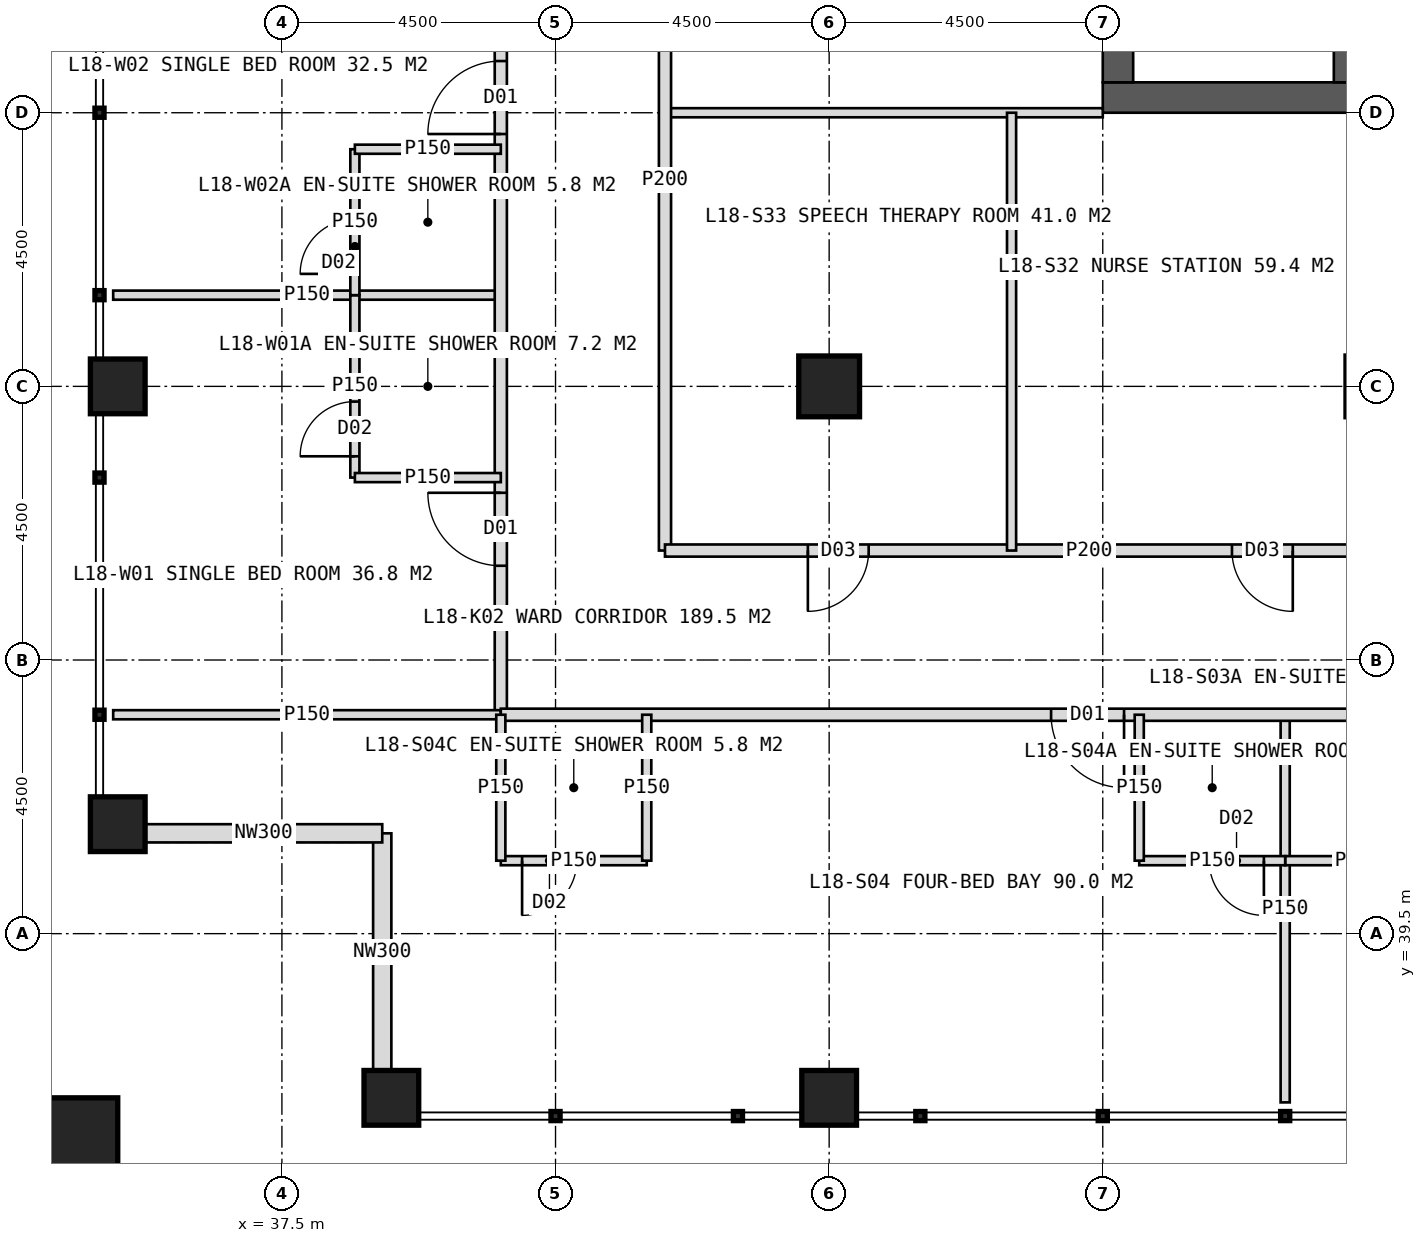
"""IFC4 building model, lengths in metres.
Left out: names, types, materials, properties, quantities, classifications, styles, units other than length and angle.
Written with IfcOpenShell. Run it as: python <this file> out.ifc"""

import sys

from ifc_helpers import new_model, si_unit, direction, frame, frame_2d, origin, origin_2d, place, context, subcontext, project, spatial, rectangle, hollow_rectangle, extrude, element, fill, save


model = new_model("IFC4")
c1 = context("Model", 3, precision=1e-05, world=origin(), true_north=direction((0.0, 1.0)))
c2 = subcontext(c1, "Body", "Model", "MODEL_VIEW")
j1 = project(units=[si_unit("LENGTHUNIT", "METRE"), si_unit("PLANEANGLEUNIT", "RADIAN")], contexts=[c1])
p1 = place(None, origin())
s1 = spatial("IfcSite", under=j1, at=p1, CompositionType="ELEMENT")
p2 = place(p1, origin())
s2 = spatial("IfcBuilding", under=s1, at=p2, CompositionType="ELEMENT")
p3 = place(p2, frame((0.0, 0.0, 79.0)))
s3 = spatial("IfcBuildingStorey", under=s2, at=p3, CompositionType="ELEMENT", Elevation=79.0)
p4 = place(p3, frame((51.0, 53.25, 0.0), z_axis=(0.0, 0.0, 1.0), x_axis=(1.0, 0.0, 0.0)))
e1 = element("IfcWall", 1, at=p4, inside=s3, PredefinedType="SHEAR", context=c2, shape_type="SweptSolid", body=[
    extrude(rectangle(XDim=18.0, YDim=0.5, at=frame_2d((9.0, 0.0))), origin(), (0.0, 0.0, 1.0), 4.0),
])
p5 = place(p4, frame((8.1, 0.0, 0.0)))
e2 = element("IfcOpeningElement", 2, at=p5, cuts=e1, PredefinedType="OPENING", context=c2, shape_type="SweptSolid", body=[
    extrude(rectangle(XDim=1.8, YDim=2.2, at=frame_2d((0.9, 1.1))), frame((0.0, 0.26, 0.0), z_axis=(0.0, -1.0, 0.0), x_axis=(1.0, 0.0, 0.0)), (0.0, 0.0, 1.0), 0.52),
])
p6 = place(p3, frame((51.25, 53.5, 0.0), z_axis=(0.0, 0.0, 1.0), x_axis=(0.0, 1.0, 0.0)))
e3 = element("IfcWall", 3, at=p6, inside=s3, PredefinedType="SHEAR", context=c2, shape_type="SweptSolid", body=[
    extrude(rectangle(XDim=17.0, YDim=0.5, at=frame_2d((8.5, 0.0))), origin(), (0.0, 0.0, 1.0), 4.0),
])
p7 = place(p6, frame((6.0, 0.0, 0.0)))
e4 = element("IfcOpeningElement", 4, at=p7, cuts=e3, PredefinedType="OPENING", context=c2, shape_type="SweptSolid", body=[
    extrude(rectangle(XDim=1.5, YDim=2.2, at=frame_2d((0.75, 1.1))), frame((0.0, 0.26, 0.0), z_axis=(0.0, -1.0, 0.0), x_axis=(1.0, 0.0, 0.0)), (0.0, 0.0, 1.0), 0.52),
])
p8 = place(p3, frame((54.95, 53.5, 0.0), z_axis=(0.0, 0.0, 1.0), x_axis=(0.0, 1.0, 0.0)))
e5 = element("IfcWall", 5, at=p8, inside=s3, PredefinedType="SHEAR", context=c2, shape_type="SweptSolid", body=[
    extrude(rectangle(XDim=17.0, YDim=0.3, at=frame_2d((8.5, 0.0))), origin(), (0.0, 0.0, 1.0), 4.0),
])
p9 = place(p3, frame((46.5, 48.5, 0.0), z_axis=(0.0, 0.0, 1.0), x_axis=(1.0, 0.0, 0.0)))
e6 = element("IfcColumn", 6, at=p9, inside=s3, PredefinedType="COLUMN", context=c2, shape_type="SweptSolid", body=[
    extrude(hollow_rectangle(XDim=1.0, YDim=1.0, WallThickness=0.1, at=origin_2d()), origin(), (0.0, 0.0, 1.0), 4.0),
])
for number, where, z_axis, x_axis in (
    (7, (39.3, 36.8, 0.0), (0.0, 0.0, 1.0), (1.0, 0.0, 0.0)),
    (8, (34.8, 41.3, 0.0), (0.0, 0.0, 1.0), (1.0, 0.0, 0.0)),
    (9, (46.5, 36.8, 0.0), (0.0, 0.0, 1.0), (1.0, 0.0, 0.0)),
    (10, (34.8, 48.5, 0.0), (0.0, 0.0, 1.0), (1.0, 0.0, 0.0)),
):
    element("IfcColumn", number, at=place(p3, frame(where, z_axis=z_axis, x_axis=x_axis)), inside=s3, PredefinedType="COLUMN", context=c2, shape_type="SweptSolid", body=[
        extrude(hollow_rectangle(XDim=0.9, YDim=0.9, WallThickness=0.08, at=origin_2d()), origin(), (0.0, 0.0, 1.0), 4.0),
    ])
p10 = place(p3, frame((33.9, 35.9, 0.0), z_axis=(0.0, 0.0, 1.0), x_axis=(1.0, 0.0, 0.0)))
e11 = element("IfcColumn", 11, at=p10, inside=s3, PredefinedType="COLUMN", context=c2, shape_type="SweptSolid", body=[
    extrude(hollow_rectangle(XDim=1.8, YDim=1.8, WallThickness=0.1, at=origin_2d()), origin(), (0.0, 0.0, 1.0), 4.0),
])
for number, where, z_axis, x_axis in (
    (12, (39.15, 37.25, 0.0), (0.0, 0.0, 1.0), (0.0, 1.0, 0.0)),
    (13, (39.15, 41.15, 0.0), (0.0, 0.0, 1.0), (-1.0, 0.0, 0.0)),
):
    element("IfcWall", number, at=place(p3, frame(where, z_axis=z_axis, x_axis=x_axis)), inside=s3, PredefinedType="ELEMENTEDWALL", context=c2, shape_type="SweptSolid", body=[
        extrude(rectangle(XDim=3.9, YDim=0.3, at=frame_2d((1.95, 0.0))), origin(), (0.0, 0.0, 1.0), 2.95),
    ])
p11 = place(p3, frame((41.1, 50.0, 0.0), z_axis=(0.0, 0.0, 1.0), x_axis=(-1.0, 0.0, 0.0)))
e14 = element("IfcWall", 14, at=p11, inside=s3, PredefinedType="PARTITIONING", context=c2, shape_type="SweptSolid", body=[
    extrude(rectangle(XDim=6.375, YDim=0.15, at=frame_2d((3.188, 0.0))), origin(), (0.0, 0.0, 1.0), 3.75),
])
p12 = place(p3, frame((41.1, 43.1, 0.0), z_axis=(0.0, 0.0, 1.0), x_axis=(0.0, 1.0, 0.0)))
e15 = element("IfcWall", 15, at=p12, inside=s3, PredefinedType="PARTITIONING", context=c2, shape_type="SweptSolid", body=[
    extrude(rectangle(XDim=37.8, YDim=0.2, at=frame_2d((18.9, 0.0))), origin(), (0.0, 0.0, 1.0), 3.75),
])
p13 = place(p12, frame((2.45, 0.0, 0.0)))
e16 = element("IfcOpeningElement", 16, at=p13, cuts=e15, PredefinedType="OPENING", context=c2, shape_type="SweptSolid", body=[
    extrude(rectangle(XDim=1.2, YDim=2.2, at=frame_2d((0.6, 1.1))), frame((0.0, 0.11, 0.0), z_axis=(0.0, -1.0, 0.0), x_axis=(1.0, 0.0, 0.0)), (0.0, 0.0, 1.0), 0.22),
])
p14 = place(p12, frame((9.55, 0.0, 0.0)))
e17 = element("IfcOpeningElement", 17, at=p14, cuts=e15, PredefinedType="OPENING", context=c2, shape_type="SweptSolid", body=[
    extrude(rectangle(XDim=1.2, YDim=2.2, at=frame_2d((0.6, 1.1))), frame((0.0, 0.11, 0.0), z_axis=(0.0, -1.0, 0.0), x_axis=(1.0, 0.0, 0.0)), (0.0, 0.0, 1.0), 0.22),
])
p15 = place(p12, frame((15.05, 0.0, 0.0)))
e18 = element("IfcOpeningElement", 18, at=p15, cuts=e15, PredefinedType="OPENING", context=c2, shape_type="SweptSolid", body=[
    extrude(rectangle(XDim=1.2, YDim=2.2, at=frame_2d((0.6, 1.1))), frame((0.0, 0.11, 0.0), z_axis=(0.0, -1.0, 0.0), x_axis=(1.0, 0.0, 0.0)), (0.0, 0.0, 1.0), 0.22),
])
p16 = place(p12, frame((21.55, 0.0, 0.0)))
e19 = element("IfcOpeningElement", 19, at=p16, cuts=e15, PredefinedType="OPENING", context=c2, shape_type="SweptSolid", body=[
    extrude(rectangle(XDim=1.2, YDim=2.2, at=frame_2d((0.6, 1.1))), frame((0.0, 0.11, 0.0), z_axis=(0.0, -1.0, 0.0), x_axis=(1.0, 0.0, 0.0)), (0.0, 0.0, 1.0), 0.22),
])
p17 = place(p12, frame((33.95, 0.0, 0.0)))
e20 = element("IfcOpeningElement", 20, at=p17, cuts=e15, PredefinedType="OPENING", context=c2, shape_type="SweptSolid", body=[
    extrude(rectangle(XDim=1.2, YDim=2.2, at=frame_2d((0.6, 1.1))), frame((0.0, 0.11, 0.0), z_axis=(0.0, -1.0, 0.0), x_axis=(1.0, 0.0, 0.0)), (0.0, 0.0, 1.0), 0.22),
])
p18 = place(p3, frame((41.1, 43.1, 0.0), z_axis=(0.0, 0.0, 1.0), x_axis=(-1.0, 0.0, 0.0)))
e21 = element("IfcWall", 21, at=p18, inside=s3, PredefinedType="PARTITIONING", context=c2, shape_type="SweptSolid", body=[
    extrude(rectangle(XDim=6.375, YDim=0.15, at=frame_2d((3.188, 0.0))), origin(), (0.0, 0.0, 1.0), 3.75),
])
p19 = place(p3, frame((38.7, 47.0, 0.0), z_axis=(0.0, 0.0, 1.0), x_axis=(0.0, 1.0, 0.0)))
e22 = element("IfcWall", 22, at=p19, inside=s3, PredefinedType="PARTITIONING", context=c2, shape_type="SweptSolid", body=[
    extrude(rectangle(XDim=3.0, YDim=0.15, at=frame_2d((1.5, 0.0))), origin(), (0.0, 0.0, 1.0), 3.75),
])
p20 = place(p19, frame((0.35, 0.0, 0.0)))
e23 = element("IfcOpeningElement", 23, at=p20, cuts=e22, PredefinedType="OPENING", context=c2, shape_type="SweptSolid", body=[
    extrude(rectangle(XDim=0.9, YDim=2.1, at=frame_2d((0.45, 1.05))), frame((0.0, 0.085, 0.0), z_axis=(0.0, -1.0, 0.0), x_axis=(1.0, 0.0, 0.0)), (0.0, 0.0, 1.0), 0.17),
])
p21 = place(p3, frame((41.1, 47.0, 0.0), z_axis=(0.0, 0.0, 1.0), x_axis=(-1.0, 0.0, 0.0)))
e24 = element("IfcWall", 24, at=p21, inside=s3, PredefinedType="PARTITIONING", context=c2, shape_type="SweptSolid", body=[
    extrude(rectangle(XDim=2.4, YDim=0.15, at=frame_2d((1.2, 0.0))), origin(), (0.0, 0.0, 1.0), 3.75),
])
p22 = place(p3, frame((38.7, 50.0, 0.0), z_axis=(0.0, 0.0, 1.0), x_axis=(0.0, 1.0, 0.0)))
e25 = element("IfcWall", 25, at=p22, inside=s3, PredefinedType="PARTITIONING", context=c2, shape_type="SweptSolid", body=[
    extrude(rectangle(XDim=2.4, YDim=0.15, at=frame_2d((1.2, 0.0))), origin(), (0.0, 0.0, 1.0), 3.75),
])
p23 = place(p22, frame((0.35, 0.0, 0.0)))
e26 = element("IfcOpeningElement", 26, at=p23, cuts=e25, PredefinedType="OPENING", context=c2, shape_type="SweptSolid", body=[
    extrude(rectangle(XDim=0.9, YDim=2.1, at=frame_2d((0.45, 1.05))), frame((0.0, 0.085, 0.0), z_axis=(0.0, -1.0, 0.0), x_axis=(1.0, 0.0, 0.0)), (0.0, 0.0, 1.0), 0.17),
])
p24 = place(p3, frame((41.1, 52.4, 0.0), z_axis=(0.0, 0.0, 1.0), x_axis=(-1.0, 0.0, 0.0)))
e27 = element("IfcWall", 27, at=p24, inside=s3, PredefinedType="PARTITIONING", context=c2, shape_type="SweptSolid", body=[
    extrude(rectangle(XDim=2.4, YDim=0.15, at=frame_2d((1.2, 0.0))), origin(), (0.0, 0.0, 1.0), 3.75),
])
p25 = place(p3, frame((51.0, 53.0, 0.0), z_axis=(0.0, 0.0, 1.0), x_axis=(-1.0, 0.0, 0.0)))
e28 = element("IfcWall", 28, at=p25, inside=s3, PredefinedType="PARTITIONING", context=c2, shape_type="SweptSolid", body=[
    extrude(rectangle(XDim=7.2, YDim=0.15, at=frame_2d((3.6, 0.0))), origin(), (0.0, 0.0, 1.0), 3.75),
])
p26 = place(p3, frame((43.8, 45.8, 0.0), z_axis=(0.0, 0.0, 1.0), x_axis=(0.0, 1.0, 0.0)))
e29 = element("IfcWall", 29, at=p26, inside=s3, PredefinedType="PARTITIONING", context=c2, shape_type="SweptSolid", body=[
    extrude(rectangle(XDim=12.2, YDim=0.2, at=frame_2d((6.1, 0.0))), origin(), (0.0, 0.0, 1.0), 3.75),
])
p27 = place(p26, frame((9.2, 0.0, 0.0)))
e30 = element("IfcOpeningElement", 30, at=p27, cuts=e29, PredefinedType="OPENING", context=c2, shape_type="SweptSolid", body=[
    extrude(rectangle(XDim=1.0, YDim=2.1, at=frame_2d((0.5, 1.05))), frame((0.0, 0.11, 0.0), z_axis=(0.0, -1.0, 0.0), x_axis=(1.0, 0.0, 0.0)), (0.0, 0.0, 1.0), 0.22),
])
p28 = place(p3, frame((54.0, 43.1, 0.0), z_axis=(0.0, 0.0, 1.0), x_axis=(0.0, -1.0, 0.0)))
e31 = element("IfcWall", 31, at=p28, inside=s3, PredefinedType="PARTITIONING", context=c2, shape_type="SweptSolid", body=[
    extrude(rectangle(XDim=6.375, YDim=0.15, at=frame_2d((3.188, 0.0))), origin(), (0.0, 0.0, 1.0), 3.75),
])
p29 = place(p3, frame((78.9, 43.1, 0.0), z_axis=(0.0, 0.0, 1.0), x_axis=(-1.0, 0.0, 0.0)))
e32 = element("IfcWall", 32, at=p29, inside=s3, PredefinedType="PARTITIONING", context=c2, shape_type="SweptSolid", body=[
    extrude(rectangle(XDim=37.8, YDim=0.2, at=frame_2d((18.9, 0.0))), origin(), (0.0, 0.0, 1.0), 3.75),
])
p30 = place(p29, frame((6.05, 0.0, 0.0)))
e33 = element("IfcOpeningElement", 33, at=p30, cuts=e32, PredefinedType="OPENING", context=c2, shape_type="SweptSolid", body=[
    extrude(rectangle(XDim=1.2, YDim=2.2, at=frame_2d((0.6, 1.1))), frame((0.0, 0.11, 0.0), z_axis=(0.0, -1.0, 0.0), x_axis=(1.0, 0.0, 0.0)), (0.0, 0.0, 1.0), 0.22),
])
p31 = place(p29, frame((12.55, 0.0, 0.0)))
e34 = element("IfcOpeningElement", 34, at=p31, cuts=e32, PredefinedType="OPENING", context=c2, shape_type="SweptSolid", body=[
    extrude(rectangle(XDim=1.2, YDim=2.2, at=frame_2d((0.6, 1.1))), frame((0.0, 0.11, 0.0), z_axis=(0.0, -1.0, 0.0), x_axis=(1.0, 0.0, 0.0)), (0.0, 0.0, 1.0), 0.22),
])
p32 = place(p29, frame((21.05, 0.0, 0.0)))
e35 = element("IfcOpeningElement", 35, at=p32, cuts=e32, PredefinedType="OPENING", context=c2, shape_type="SweptSolid", body=[
    extrude(rectangle(XDim=1.2, YDim=2.2, at=frame_2d((0.6, 1.1))), frame((0.0, 0.11, 0.0), z_axis=(0.0, -1.0, 0.0), x_axis=(1.0, 0.0, 0.0)), (0.0, 0.0, 1.0), 0.22),
])
p33 = place(p29, frame((27.55, 0.0, 0.0)))
e36 = element("IfcOpeningElement", 36, at=p33, cuts=e32, PredefinedType="OPENING", context=c2, shape_type="SweptSolid", body=[
    extrude(rectangle(XDim=1.2, YDim=2.2, at=frame_2d((0.6, 1.1))), frame((0.0, 0.11, 0.0), z_axis=(0.0, -1.0, 0.0), x_axis=(1.0, 0.0, 0.0)), (0.0, 0.0, 1.0), 0.22),
])
p34 = place(p3, frame((56.4, 40.7, 0.0), z_axis=(0.0, 0.0, 1.0), x_axis=(-1.0, 0.0, 0.0)))
e37 = element("IfcWall", 37, at=p34, inside=s3, PredefinedType="PARTITIONING", context=c2, shape_type="SweptSolid", body=[
    extrude(rectangle(XDim=2.4, YDim=0.15, at=frame_2d((1.2, 0.0))), origin(), (0.0, 0.0, 1.0), 3.75),
])
p35 = place(p34, frame((0.35, 0.0, 0.0)))
e38 = element("IfcOpeningElement", 38, at=p35, cuts=e37, PredefinedType="OPENING", context=c2, shape_type="SweptSolid", body=[
    extrude(rectangle(XDim=0.9, YDim=2.1, at=frame_2d((0.45, 1.05))), frame((0.0, 0.085, 0.0), z_axis=(0.0, -1.0, 0.0), x_axis=(1.0, 0.0, 0.0)), (0.0, 0.0, 1.0), 0.17),
])
p36 = place(p3, frame((54.0, 40.7, 0.0), z_axis=(0.0, 0.0, 1.0), x_axis=(-1.0, 0.0, 0.0)))
e39 = element("IfcWall", 39, at=p36, inside=s3, PredefinedType="PARTITIONING", context=c2, shape_type="SweptSolid", body=[
    extrude(rectangle(XDim=2.4, YDim=0.15, at=frame_2d((1.2, 0.0))), origin(), (0.0, 0.0, 1.0), 3.75),
])
p37 = place(p36, frame((0.35, 0.0, 0.0)))
e40 = element("IfcOpeningElement", 40, at=p37, cuts=e39, PredefinedType="OPENING", context=c2, shape_type="SweptSolid", body=[
    extrude(rectangle(XDim=0.9, YDim=2.1, at=frame_2d((0.45, 1.05))), frame((0.0, 0.085, 0.0), z_axis=(0.0, -1.0, 0.0), x_axis=(1.0, 0.0, 0.0)), (0.0, 0.0, 1.0), 0.17),
])
p38 = place(p3, frame((51.6, 43.1, 0.0), z_axis=(0.0, 0.0, 1.0), x_axis=(0.0, -1.0, 0.0)))
e41 = element("IfcWall", 41, at=p38, inside=s3, PredefinedType="PARTITIONING", context=c2, shape_type="SweptSolid", body=[
    extrude(rectangle(XDim=2.4, YDim=0.15, at=frame_2d((1.2, 0.0))), origin(), (0.0, 0.0, 1.0), 3.75),
])
p39 = place(p3, frame((43.5, 40.7, 0.0), z_axis=(0.0, 0.0, 1.0), x_axis=(-1.0, 0.0, 0.0)))
e42 = element("IfcWall", 42, at=p39, inside=s3, PredefinedType="PARTITIONING", context=c2, shape_type="SweptSolid", body=[
    extrude(rectangle(XDim=2.4, YDim=0.15, at=frame_2d((1.2, 0.0))), origin(), (0.0, 0.0, 1.0), 3.75),
])
p40 = place(p39, frame((1.15, 0.0, 0.0)))
e43 = element("IfcOpeningElement", 43, at=p40, cuts=e42, PredefinedType="OPENING", context=c2, shape_type="SweptSolid", body=[
    extrude(rectangle(XDim=0.9, YDim=2.1, at=frame_2d((0.45, 1.05))), frame((0.0, 0.085, 0.0), z_axis=(0.0, -1.0, 0.0), x_axis=(1.0, 0.0, 0.0)), (0.0, 0.0, 1.0), 0.17),
])
for number, where, z_axis, x_axis in (
    (44, (43.5, 43.1, 0.0), (0.0, 0.0, 1.0), (0.0, -1.0, 0.0)),
    (45, (41.1, 43.1, 0.0), (0.0, 0.0, 1.0), (0.0, -1.0, 0.0)),
):
    element("IfcWall", number, at=place(p3, frame(where, z_axis=z_axis, x_axis=x_axis)), inside=s3, PredefinedType="PARTITIONING", context=c2, shape_type="SweptSolid", body=[
        extrude(rectangle(XDim=2.4, YDim=0.15, at=frame_2d((1.2, 0.0))), origin(), (0.0, 0.0, 1.0), 3.75),
    ])
p41 = place(p3, frame((57.75, 45.8, 0.0), z_axis=(0.0, 0.0, 1.0), x_axis=(-1.0, 0.0, 0.0)))
e46 = element("IfcWall", 46, at=p41, inside=s3, PredefinedType="PARTITIONING", context=c2, shape_type="SweptSolid", body=[
    extrude(rectangle(XDim=13.95, YDim=0.2, at=frame_2d((6.975, 0.0))), origin(), (0.0, 0.0, 1.0), 3.75),
])
p42 = place(p41, frame((3.625, 0.0, 0.0)))
e47 = element("IfcOpeningElement", 47, at=p42, cuts=e46, PredefinedType="OPENING", context=c2, shape_type="SweptSolid", body=[
    extrude(rectangle(XDim=1.0, YDim=2.1, at=frame_2d((0.5, 1.05))), frame((0.0, 0.11, 0.0), z_axis=(0.0, -1.0, 0.0), x_axis=(1.0, 0.0, 0.0)), (0.0, 0.0, 1.0), 0.22),
])
p43 = place(p41, frame((10.6, 0.0, 0.0)))
e48 = element("IfcOpeningElement", 48, at=p43, cuts=e46, PredefinedType="OPENING", context=c2, shape_type="SweptSolid", body=[
    extrude(rectangle(XDim=1.0, YDim=2.1, at=frame_2d((0.5, 1.05))), frame((0.0, 0.11, 0.0), z_axis=(0.0, -1.0, 0.0), x_axis=(1.0, 0.0, 0.0)), (0.0, 0.0, 1.0), 0.22),
])
p44 = place(p3, frame((49.5, 53.0, 0.0), z_axis=(0.0, 0.0, 1.0), x_axis=(0.0, -1.0, 0.0)))
e49 = element("IfcWall", 49, at=p44, inside=s3, PredefinedType="PARTITIONING", context=c2, shape_type="SweptSolid", body=[
    extrude(rectangle(XDim=7.2, YDim=0.15, at=frame_2d((3.6, 0.0))), origin(), (0.0, 0.0, 1.0), 3.75),
])
p45 = place(p13, origin())
e50 = element("IfcDoor", 50, at=p45, inside=s3, OperationType="SINGLE_SWING_RIGHT", PredefinedType="DOOR", context=c2, shape_type="SweptSolid", body=[
    extrude(rectangle(XDim=1.2, YDim=2.2, at=frame_2d((0.6, 1.1))), frame((0.0, 0.025, 0.0), z_axis=(0.0, -1.0, 0.0), x_axis=(1.0, 0.0, 0.0)), (0.0, 0.0, 1.0), 0.05),
])
fill(e16, e50)
p46 = place(p20, origin())
e51 = element("IfcDoor", 51, at=p46, inside=s3, OperationType="SINGLE_SWING_LEFT", PredefinedType="DOOR", context=c2, shape_type="SweptSolid", body=[
    extrude(rectangle(XDim=0.9, YDim=2.1, at=frame_2d((0.45, 1.05))), frame((0.0, 0.025, 0.0), z_axis=(0.0, -1.0, 0.0), x_axis=(1.0, 0.0, 0.0)), (0.0, 0.0, 1.0), 0.05),
])
fill(e23, e51)
p47 = place(p14, origin())
e52 = element("IfcDoor", 52, at=p47, inside=s3, OperationType="SINGLE_SWING_LEFT", PredefinedType="DOOR", context=c2, shape_type="SweptSolid", body=[
    extrude(rectangle(XDim=1.2, YDim=2.2, at=frame_2d((0.6, 1.1))), frame((0.0, 0.025, 0.0), z_axis=(0.0, -1.0, 0.0), x_axis=(1.0, 0.0, 0.0)), (0.0, 0.0, 1.0), 0.05),
])
fill(e17, e52)
p48 = place(p23, origin())
e53 = element("IfcDoor", 53, at=p48, inside=s3, OperationType="SINGLE_SWING_LEFT", PredefinedType="DOOR", context=c2, shape_type="SweptSolid", body=[
    extrude(rectangle(XDim=0.9, YDim=2.1, at=frame_2d((0.45, 1.05))), frame((0.0, 0.025, 0.0), z_axis=(0.0, -1.0, 0.0), x_axis=(1.0, 0.0, 0.0)), (0.0, 0.0, 1.0), 0.05),
])
fill(e26, e53)
p49 = place(p33, origin())
e54 = element("IfcDoor", 54, at=p49, inside=s3, OperationType="SINGLE_SWING_LEFT", PredefinedType="DOOR", context=c2, shape_type="SweptSolid", body=[
    extrude(rectangle(XDim=1.2, YDim=2.2, at=frame_2d((0.6, 1.1))), frame((0.0, 0.025, 0.0), z_axis=(0.0, -1.0, 0.0), x_axis=(1.0, 0.0, 0.0)), (0.0, 0.0, 1.0), 0.05),
])
fill(e36, e54)
p50 = place(p37, origin())
e55 = element("IfcDoor", 55, at=p50, inside=s3, OperationType="SINGLE_SWING_LEFT", PredefinedType="DOOR", context=c2, shape_type="SweptSolid", body=[
    extrude(rectangle(XDim=0.9, YDim=2.1, at=frame_2d((0.45, 1.05))), frame((0.0, 0.025, 0.0), z_axis=(0.0, -1.0, 0.0), x_axis=(1.0, 0.0, 0.0)), (0.0, 0.0, 1.0), 0.05),
])
fill(e40, e55)
p51 = place(p40, origin())
e56 = element("IfcDoor", 56, at=p51, inside=s3, OperationType="SINGLE_SWING_RIGHT", PredefinedType="DOOR", context=c2, shape_type="SweptSolid", body=[
    extrude(rectangle(XDim=0.9, YDim=2.1, at=frame_2d((0.45, 1.05))), frame((0.0, 0.025, 0.0), z_axis=(0.0, -1.0, 0.0), x_axis=(1.0, 0.0, 0.0)), (0.0, 0.0, 1.0), 0.05),
])
fill(e43, e56)
p52 = place(p42, origin())
e57 = element("IfcDoor", 57, at=p52, inside=s3, OperationType="SINGLE_SWING_LEFT", PredefinedType="DOOR", context=c2, shape_type="SweptSolid", body=[
    extrude(rectangle(XDim=1.0, YDim=2.1, at=frame_2d((0.5, 1.05))), frame((0.0, 0.025, 0.0), z_axis=(0.0, -1.0, 0.0), x_axis=(1.0, 0.0, 0.0)), (0.0, 0.0, 1.0), 0.05),
])
fill(e47, e57)
p53 = place(p43, origin())
e58 = element("IfcDoor", 58, at=p53, inside=s3, OperationType="SINGLE_SWING_RIGHT", PredefinedType="DOOR", context=c2, shape_type="SweptSolid", body=[
    extrude(rectangle(XDim=1.0, YDim=2.1, at=frame_2d((0.5, 1.05))), frame((0.0, 0.025, 0.0), z_axis=(0.0, -1.0, 0.0), x_axis=(1.0, 0.0, 0.0)), (0.0, 0.0, 1.0), 0.05),
])
fill(e48, e58)
save(model, sys.argv[1])
